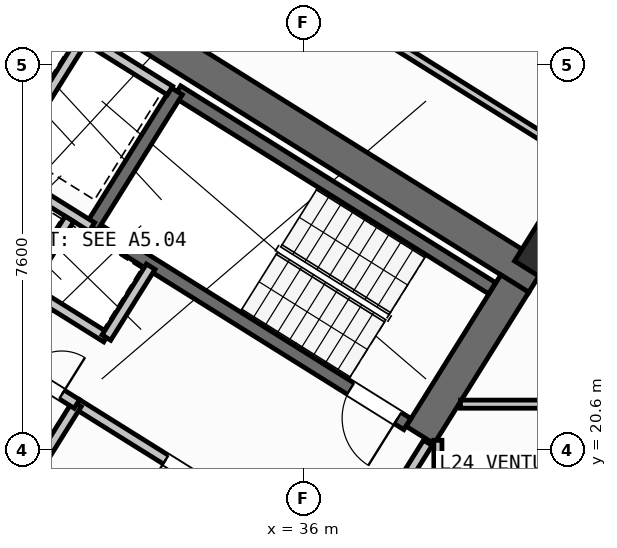
"""IFC4 building model, lengths in metres.
Left out: names, types, materials, properties, quantities, classifications, styles, units other than length and angle.
Written with IfcOpenShell. Run it as: python <this file> out.ifc"""

import sys

from ifc_helpers import new_model, si_unit, direction, frame, frame_2d, origin, origin_2d, place, context, subcontext, project, spatial, rectangle, hollow_rectangle, extrude, source, transform, mapped, element, fill, save


model = new_model("IFC4")
c1 = context("Model", 3, precision=1e-05, world=origin(), true_north=direction((0.0, 1.0)))
c2 = subcontext(c1, "Body", "Model", "MODEL_VIEW")
j1 = project(units=[si_unit("LENGTHUNIT", "METRE"), si_unit("PLANEANGLEUNIT", "RADIAN")], contexts=[c1])
p1 = place(None, origin())
s1 = spatial("IfcSite", under=j1, at=p1, CompositionType="ELEMENT")
p2 = place(p1, origin())
s2 = spatial("IfcBuilding", under=s1, at=p2, CompositionType="ELEMENT")
p3 = place(p2, frame((0.0, 0.0, 97.2)))
s3 = spatial("IfcBuildingStorey", under=s2, at=p3, CompositionType="ELEMENT", Elevation=97.2)
p4 = place(p3, frame((40.615, 23.983, 0.0), z_axis=(0.0, 0.0, 1.0), x_axis=(-0.848045953968, 0.529922692436, 0.0)))
e1 = element("IfcWall", 1, at=p4, inside=s3, PredefinedType="SHEAR", context=c2, shape_type="SweptSolid", body=[
    extrude(rectangle(XDim=13.24, YDim=0.65, at=frame_2d((6.62, 0.0))), origin(), (0.0, 0.0, 1.0), 3.32),
])
p5 = place(p3, frame((40.168, 23.88, 0.0), z_axis=(0.0, 0.0, 1.0), x_axis=(-0.529893103397, -0.8480644427, 0.0)))
e2 = element("IfcWall", 2, at=p5, inside=s3, PredefinedType="SHEAR", context=c2, shape_type="SweptSolid", body=[
    extrude(rectangle(XDim=3.525, YDim=0.65, at=frame_2d((1.763, 0.0))), origin(), (0.0, 0.0, 1.0), 3.32),
])
m1 = source(origin(), c2, "Body", "SweptSolid", [
    extrude(hollow_rectangle(XDim=0.9, YDim=0.9, WallThickness=0.036, at=origin_2d()), origin(), (0.0, 0.0, 1.0), 3.6),
])
p6 = place(p3, frame((40.783, 24.469, 0.0), z_axis=(0.0, 0.0, 1.0), x_axis=(-0.848048096156, 0.529919264233, 0.0)))
e3 = element("IfcColumn", 3, at=p6, inside=s3, PredefinedType="COLUMN", context=c2, shape_type="MappedRepresentation", body=[
    mapped(m1, transform((0.0, 0.0, 0.0), scale=1.0)),
])
p7 = place(p3, frame((31.76, 12.183, 0.0), z_axis=(0.0, 0.0, 1.0), x_axis=(-0.848047074256, 0.529920899612, 0.0)))
e4 = element("IfcWall", 4, at=p7, inside=s3, PredefinedType="STANDARD", context=c2, shape_type="SweptSolid", body=[
    extrude(rectangle(XDim=30.652, YDim=0.32, at=frame_2d((15.326, 0.0))), origin(), (0.0, 0.0, 1.0), 3.32),
])
p8 = place(p7, frame((15.153, 0.0, 0.0)))
e5 = element("IfcOpeningElement", 5, at=p8, cuts=e4, PredefinedType="OPENING", context=c2, shape_type="SweptSolid", body=[
    extrude(rectangle(XDim=1.2, YDim=2.15, at=frame_2d((0.6, 1.075))), frame((0.0, 0.17, 0.0), z_axis=(0.0, -1.0, 0.0), x_axis=(1.0, 0.0, 0.0)), (0.0, 0.0, 1.0), 0.34),
])
p9 = place(p7, frame((2.002, 0.0, 0.8)))
e6 = element("IfcOpeningElement", 6, at=p9, cuts=e4, PredefinedType="OPENING", context=c2, shape_type="SweptSolid", body=[
    extrude(rectangle(XDim=2.1, YDim=1.55, at=frame_2d((1.05, 0.775))), frame((0.0, 0.17, 0.0), z_axis=(0.0, -1.0, 0.0), x_axis=(1.0, 0.0, 0.0)), (0.0, 0.0, 1.0), 0.34),
])
p10 = place(p7, frame((7.206, 0.0, 0.8)))
e7 = element("IfcOpeningElement", 7, at=p10, cuts=e4, PredefinedType="OPENING", context=c2, shape_type="SweptSolid", body=[
    extrude(rectangle(XDim=2.1, YDim=1.55, at=frame_2d((1.05, 0.775))), frame((0.0, 0.17, 0.0), z_axis=(0.0, -1.0, 0.0), x_axis=(1.0, 0.0, 0.0)), (0.0, 0.0, 1.0), 0.34),
])
p11 = place(p7, frame((12.648, 0.0, 1.0)))
e8 = element("IfcOpeningElement", 8, at=p11, cuts=e4, PredefinedType="OPENING", context=c2, shape_type="SweptSolid", body=[
    extrude(rectangle(XDim=0.9, YDim=1.25, at=frame_2d((0.45, 0.625))), frame((0.0, 0.17, 0.0), z_axis=(0.0, -1.0, 0.0), x_axis=(1.0, 0.0, 0.0)), (0.0, 0.0, 1.0), 0.34),
])
p12 = place(p7, frame((27.974, 0.0, 0.95)))
e9 = element("IfcOpeningElement", 9, at=p12, cuts=e4, PredefinedType="OPENING", context=c2, shape_type="SweptSolid", body=[
    extrude(rectangle(XDim=1.2, YDim=1.4, at=frame_2d((0.6, 0.7))), frame((0.0, 0.17, 0.0), z_axis=(0.0, -1.0, 0.0), x_axis=(1.0, 0.0, 0.0)), (0.0, 0.0, 1.0), 0.34),
])
p13 = place(p7, frame((18.347, 0.0, 1.0)))
e10 = element("IfcOpeningElement", 10, at=p13, cuts=e4, PredefinedType="OPENING", context=c2, shape_type="SweptSolid", body=[
    extrude(rectangle(XDim=0.9, YDim=1.25, at=frame_2d((0.45, 0.625))), frame((0.0, 0.17, 0.0), z_axis=(0.0, -1.0, 0.0), x_axis=(1.0, 0.0, 0.0)), (0.0, 0.0, 1.0), 0.34),
])
p14 = place(p7, frame((20.931, 0.0, 1.0)))
e11 = element("IfcOpeningElement", 11, at=p14, cuts=e4, PredefinedType="OPENING", context=c2, shape_type="SweptSolid", body=[
    extrude(rectangle(XDim=0.65, YDim=1.15, at=frame_2d((0.325, 0.575))), frame((0.0, 0.17, 0.0), z_axis=(0.0, -1.0, 0.0), x_axis=(1.0, 0.0, 0.0)), (0.0, 0.0, 1.0), 0.34),
])
p15 = place(p7, frame((22.938, 0.0, 1.0)))
e12 = element("IfcOpeningElement", 12, at=p15, cuts=e4, PredefinedType="OPENING", context=c2, shape_type="SweptSolid", body=[
    extrude(rectangle(XDim=0.9, YDim=1.25, at=frame_2d((0.45, 0.625))), frame((0.0, 0.17, 0.0), z_axis=(0.0, -1.0, 0.0), x_axis=(1.0, 0.0, 0.0)), (0.0, 0.0, 1.0), 0.34),
])
p16 = place(p7, frame((25.069, 0.0, 1.0)))
e13 = element("IfcOpeningElement", 13, at=p16, cuts=e4, PredefinedType="OPENING", context=c2, shape_type="SweptSolid", body=[
    extrude(rectangle(XDim=0.9, YDim=1.25, at=frame_2d((0.45, 0.625))), frame((0.0, 0.17, 0.0), z_axis=(0.0, -1.0, 0.0), x_axis=(1.0, 0.0, 0.0)), (0.0, 0.0, 1.0), 0.34),
])
p17 = place(p3, frame((31.28, 18.261, 0.0), z_axis=(0.0, 0.0, 1.0), x_axis=(-0.848051618787, 0.529913626805, 0.0)))
e14 = element("IfcWall", 14, at=p17, inside=s3, PredefinedType="SHEAR", context=c2, shape_type="SweptSolid", body=[
    extrude(rectangle(XDim=7.46, YDim=0.26, at=frame_2d((3.73, 0.0))), origin(), (0.0, 0.0, 1.0), 3.32),
])
p18 = place(p17, frame((0.36, 0.0, 0.0)))
e15 = element("IfcOpeningElement", 15, at=p18, cuts=e14, PredefinedType="OPENING", context=c2, shape_type="SweptSolid", body=[
    extrude(rectangle(XDim=0.86, YDim=2.05, at=frame_2d((0.43, 1.025))), frame((0.0, 0.14, 0.0), z_axis=(0.0, -1.0, 0.0), x_axis=(1.0, 0.0, 0.0)), (0.0, 0.0, 1.0), 0.28),
])
p19 = place(p3, frame((39.721, 23.788, 0.0), z_axis=(0.0, 0.0, 1.0), x_axis=(-0.848054434086, 0.529909121291, 0.0)))
e16 = element("IfcWall", 16, at=p19, inside=s3, PredefinedType="SHEAR", context=c2, shape_type="SweptSolid", body=[
    extrude(rectangle(XDim=7.33, YDim=0.26, at=frame_2d((3.665, 0.0))), origin(), (0.0, 0.0, 1.0), 3.32),
])
p20 = place(p3, frame((38.046, 21.108, 0.0), z_axis=(0.0, 0.0, 1.0), x_axis=(-0.848054434086, 0.529909121291, 0.0)))
e17 = element("IfcWall", 17, at=p20, inside=s3, PredefinedType="SHEAR", context=c2, shape_type="SweptSolid", body=[
    extrude(rectangle(XDim=7.33, YDim=0.26, at=frame_2d((3.665, 0.0))), origin(), (0.0, 0.0, 1.0), 3.32),
])
p21 = place(p20, frame((0.22, 0.0, 0.0)))
e18 = element("IfcOpeningElement", 18, at=p21, cuts=e17, PredefinedType="OPENING", context=c2, shape_type="SweptSolid", body=[
    extrude(rectangle(XDim=1.1, YDim=2.1, at=frame_2d((0.55, 1.05))), frame((0.0, 0.14, 0.0), z_axis=(0.0, -1.0, 0.0), x_axis=(1.0, 0.0, 0.0)), (0.0, 0.0, 1.0), 0.28),
])
p22 = place(p3, frame((33.496, 27.677, 0.0), z_axis=(0.0, 0.0, 1.0), x_axis=(-0.529908658664, -0.84805472316, 0.0)))
e19 = element("IfcWall", 19, at=p22, inside=s3, PredefinedType="SHEAR", context=c2, shape_type="SweptSolid", body=[
    extrude(rectangle(XDim=3.16, YDim=0.26, at=frame_2d((1.58, 0.0))), origin(), (0.0, 0.0, 1.0), 3.32),
])
p23 = place(p3, frame((36.374, 18.474, 0.0), z_axis=(0.0, 0.0, 1.0), x_axis=(-0.848051071577, 0.529914502535, 0.0)))
e20 = element("IfcWall", 20, at=p23, inside=s3, PredefinedType="STANDARD", context=c2, shape_type="SweptSolid", body=[
    extrude(rectangle(XDim=5.718, YDim=0.2, at=frame_2d((2.859, 0.0))), origin(), (0.0, 0.0, 1.0), 3.31),
])
p24 = place(p23, frame((2.498, 0.0, 0.0)))
e21 = element("IfcOpeningElement", 21, at=p24, cuts=e20, PredefinedType="OPENING", context=c2, shape_type="SweptSolid", body=[
    extrude(rectangle(XDim=1.15, YDim=2.1, at=frame_2d((0.575, 1.05))), frame((0.0, 0.11, 0.0), z_axis=(0.0, -1.0, 0.0), x_axis=(1.0, 0.0, 0.0)), (0.0, 0.0, 1.0), 0.22),
])
p25 = place(p3, frame((31.822, 24.998, 0.0), z_axis=(0.0, 0.0, 1.0), x_axis=(-0.848058348634, 0.529902856485, 0.0)))
e22 = element("IfcWall", 22, at=p25, inside=s3, PredefinedType="STANDARD", context=c2, shape_type="SweptSolid", body=[
    extrude(rectangle(XDim=4.568, YDim=0.2, at=frame_2d((2.284, 0.0))), origin(), (0.0, 0.0, 1.0), 3.31),
])
p26 = place(p3, frame((32.108, 22.814, 0.0), z_axis=(0.0, 0.0, 1.0), x_axis=(-0.848042229521, 0.529928652696, 0.0)))
e23 = element("IfcWall", 23, at=p26, inside=s3, PredefinedType="STANDARD", context=c2, shape_type="SweptSolid", body=[
    extrude(rectangle(XDim=5.62, YDim=0.2, at=frame_2d((2.81, 0.0))), origin(), (0.0, 0.0, 1.0), 3.31),
])
p27 = place(p3, frame((32.982, 24.213, 0.0), z_axis=(0.0, 0.0, 1.0), x_axis=(-0.529839334948, -0.84809803628, 0.0)))
e24 = element("IfcWall", 24, at=p27, inside=s3, PredefinedType="STANDARD", context=c2, shape_type="SweptSolid", body=[
    extrude(rectangle(XDim=1.65, YDim=0.2, at=frame_2d((0.825, 0.0))), origin(), (0.0, 0.0, 1.0), 3.31),
])
p28 = place(p3, frame((31.645, 28.716, 0.0), z_axis=(0.0, 0.0, 1.0), x_axis=(-0.52986693015, -0.848080795876, 0.0)))
e25 = element("IfcWall", 25, at=p28, inside=s3, PredefinedType="STANDARD", context=c2, shape_type="SweptSolid", body=[
    extrude(rectangle(XDim=2.66, YDim=0.2, at=frame_2d((1.33, 0.0))), origin(), (0.0, 0.0, 1.0), 3.31),
])
p29 = place(p3, frame((33.363, 27.69, 0.0), z_axis=(0.0, 0.0, 1.0), x_axis=(-0.848053806312, 0.529910125964, 0.0)))
e26 = element("IfcWall", 26, at=p29, inside=s3, PredefinedType="STANDARD", context=c2, shape_type="SweptSolid", body=[
    extrude(rectangle(XDim=4.448, YDim=0.2, at=frame_2d((2.224, 0.0))), origin(), (0.0, 0.0, 1.0), 3.31),
])
p30 = place(p3, frame((31.379, 25.156, 0.0), z_axis=(0.0, 0.0, 1.0), x_axis=(-0.529998940003, -0.847998304005, 0.0)))
e27 = element("IfcWall", 27, at=p30, inside=s3, PredefinedType="STANDARD", context=c2, shape_type="SweptSolid", body=[
    extrude(rectangle(XDim=1.58, YDim=0.2, at=frame_2d((0.79, 0.0))), origin(), (0.0, 0.0, 1.0), 3.31),
])
p31 = place(p3, frame((31.525, 21.504, 0.0), z_axis=(0.0, 0.0, 1.0), x_axis=(-0.529907497854, -0.848055448493, 0.0)))
e28 = element("IfcWall", 28, at=p31, inside=s3, PredefinedType="STANDARD", context=c2, shape_type="SweptSolid", body=[
    extrude(rectangle(XDim=2.88, YDim=0.2, at=frame_2d((1.44, 0.0))), origin(), (0.0, 0.0, 1.0), 3.31),
])
p32 = place(p3, frame((31.525, 21.504, 0.0), z_axis=(0.0, 0.0, 1.0), x_axis=(-0.848044998614, 0.529924221305, 0.0)))
e29 = element("IfcWall", 29, at=p32, inside=s3, PredefinedType="STANDARD", context=c2, shape_type="SweptSolid", body=[
    extrude(rectangle(XDim=6.168, YDim=0.2, at=frame_2d((3.084, 0.0))), origin(), (0.0, 0.0, 1.0), 3.31),
])
p33 = place(p32, frame((4.4, 0.0, 0.0)))
e30 = element("IfcOpeningElement", 30, at=p33, cuts=e29, PredefinedType="OPENING", context=c2, shape_type="SweptSolid", body=[
    extrude(rectangle(XDim=0.86, YDim=2.05, at=frame_2d((0.43, 1.025))), frame((0.0, 0.11, 0.0), z_axis=(0.0, -1.0, 0.0), x_axis=(1.0, 0.0, 0.0)), (0.0, 0.0, 1.0), 0.22),
])
p34 = place(p32, frame((0.35, 0.0, 0.0)))
e31 = element("IfcOpeningElement", 31, at=p34, cuts=e29, PredefinedType="OPENING", context=c2, shape_type="SweptSolid", body=[
    extrude(rectangle(XDim=0.86, YDim=2.05, at=frame_2d((0.43, 1.025))), frame((0.0, 0.11, 0.0), z_axis=(0.0, -1.0, 0.0), x_axis=(1.0, 0.0, 0.0)), (0.0, 0.0, 1.0), 0.22),
])
p35 = place(p3, frame((41.936, 26.012, 0.0), z_axis=(0.0, 0.0, 1.0), x_axis=(-0.848051154596, 0.529914369676, 0.0)))
e32 = element("IfcWall", 32, at=p35, inside=s3, PredefinedType="PARTITIONING", context=c2, shape_type="SweptSolid", body=[
    extrude(rectangle(XDim=15.57, YDim=0.16, at=frame_2d((7.785, 0.0))), origin(), (0.0, 0.0, 1.0), 3.31),
])
p36 = place(p35, frame((10.83, 0.0, 0.0)))
e33 = element("IfcOpeningElement", 33, at=p36, cuts=e32, PredefinedType="OPENING", context=c2, shape_type="SweptSolid", body=[
    extrude(rectangle(XDim=1.0, YDim=2.1, at=frame_2d((0.5, 1.05))), frame((0.0, 0.09, 0.0), z_axis=(0.0, -1.0, 0.0), x_axis=(1.0, 0.0, 0.0)), (0.0, 0.0, 1.0), 0.18),
])
p37 = place(p3, frame((38.451, 20.737, 0.0), z_axis=(0.0, 0.0, 1.0), x_axis=(-0.529924799939, -0.848044637038, 0.0)))
e34 = element("IfcWall", 34, at=p37, inside=s3, PredefinedType="STANDARD", context=c2, shape_type="SweptSolid", body=[
    extrude(rectangle(XDim=2.96, YDim=0.2, at=frame_2d((1.48, 0.0))), origin(), (0.0, 0.0, 1.0), 3.31),
])
p38 = place(p37, frame((1.46, 0.0, 0.0)))
e35 = element("IfcOpeningElement", 35, at=p38, cuts=e34, PredefinedType="OPENING", context=c2, shape_type="SweptSolid", body=[
    extrude(rectangle(XDim=0.86, YDim=2.05, at=frame_2d((0.43, 1.025))), frame((0.0, 0.11, 0.0), z_axis=(0.0, -1.0, 0.0), x_axis=(1.0, 0.0, 0.0)), (0.0, 0.0, 1.0), 0.22),
])
p39 = place(p3, frame((38.65, 17.93, 0.0), z_axis=(0.0, 0.0, 1.0), x_axis=(0.0, 1.0, 0.0)))
e36 = element("IfcWall", 36, at=p39, inside=s3, PredefinedType="PARTITIONING", context=c2, shape_type="SweptSolid", body=[
    extrude(rectangle(XDim=2.857, YDim=0.16, at=frame_2d((1.428, 0.0))), origin(), (0.0, 0.0, 1.0), 3.31),
])
p40 = place(p3, frame((39.095, 21.5, 0.0), z_axis=(0.0, 0.0, 1.0), x_axis=(1.0, 0.0, 0.0)))
e37 = element("IfcWall", 37, at=p40, inside=s3, PredefinedType="PARTITIONING", context=c2, shape_type="SweptSolid", body=[
    extrude(rectangle(XDim=7.094, YDim=0.16, at=frame_2d((3.547, 0.0))), origin(), (0.0, 0.0, 1.0), 3.31),
])
m2 = source(origin(), c2, "Body", "SweptSolid", [
    extrude(rectangle(XDim=1.1, YDim=2.1, at=frame_2d((0.55, 1.05))), frame((0.0, 0.025, 0.0), z_axis=(0.0, -1.0, 0.0), x_axis=(1.0, 0.0, 0.0)), (0.0, 0.0, 1.0), 0.05),
])
p41 = place(p21, origin())
e38 = element("IfcDoor", 38, at=p41, inside=s3, OperationType="SINGLE_SWING_LEFT", PredefinedType="DOOR", context=c2, shape_type="MappedRepresentation", body=[
    mapped(m2, transform((0.0, 0.0, 0.0), scale=1.0)),
])
fill(e18, e38)
m3 = source(origin(), c2, "Body", "SweptSolid", [
    extrude(rectangle(XDim=1.15, YDim=2.1, at=frame_2d((0.575, 1.05))), frame((0.0, 0.025, 0.0), z_axis=(0.0, -1.0, 0.0), x_axis=(1.0, 0.0, 0.0)), (0.0, 0.0, 1.0), 0.05),
])
p42 = place(p24, origin())
e39 = element("IfcDoor", 39, at=p42, inside=s3, OperationType="SINGLE_SWING_RIGHT", PredefinedType="DOOR", context=c2, shape_type="MappedRepresentation", body=[
    mapped(m3, transform((0.0, 0.0, 0.0), scale=1.0)),
])
fill(e21, e39)
m4 = source(origin(), c2, "Body", "SweptSolid", [
    extrude(rectangle(XDim=0.86, YDim=2.05, at=frame_2d((0.43, 1.025))), frame((0.0, 0.025, 0.0), z_axis=(0.0, -1.0, 0.0), x_axis=(1.0, 0.0, 0.0)), (0.0, 0.0, 1.0), 0.05),
])
p43 = place(p34, frame((0.86, 0.0, 0.0), z_axis=(0.0, 0.0, 1.0), x_axis=(-1.0, 0.0, 0.0)))
e40 = element("IfcDoor", 40, at=p43, inside=s3, OperationType="SINGLE_SWING_RIGHT", PredefinedType="DOOR", context=c2, shape_type="MappedRepresentation", body=[
    mapped(m4, transform((0.0, 0.0, 0.0), scale=1.0)),
])
fill(e31, e40)
save(model, sys.argv[1])
